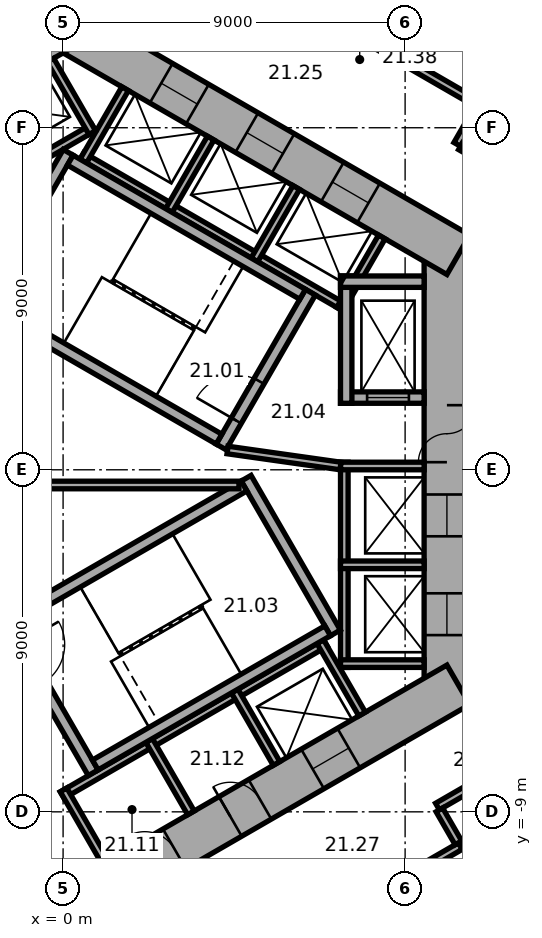
"""IFC4 building model, lengths in metres.
Left out: names, types, materials, properties, quantities, classifications, styles, units other than length and angle.
Written with IfcOpenShell. Run it as: python <this file> out.ifc"""

import sys

from ifc_helpers import new_model, si_unit, direction, frame, frame_2d, origin, place, context, subcontext, project, spatial, rectangle, extrude, element, fill, save


model = new_model("IFC4")
c1 = context("Model", 3, precision=1e-05, world=origin(), true_north=direction((0.0, 1.0)))
c2 = subcontext(c1, "Body", "Model", "MODEL_VIEW")
j1 = project(units=[si_unit("LENGTHUNIT", "METRE"), si_unit("PLANEANGLEUNIT", "RADIAN")], contexts=[c1])
p1 = place(None, origin())
s1 = spatial("IfcSite", under=j1, at=p1, CompositionType="ELEMENT")
p2 = place(p1, origin())
s2 = spatial("IfcBuilding", under=s1, at=p2, CompositionType="ELEMENT")
p3 = place(p2, frame((0.0, 0.0, 93.5)))
s3 = spatial("IfcBuildingStorey", under=s2, at=p3, CompositionType="ELEMENT", Elevation=93.5)
p4 = place(p3, frame((10.1, -6.177, 0.0), z_axis=(0.0, 0.0, 1.0), x_axis=(0.0, 1.0, 0.0)))
e1 = element("IfcWall", 1, at=p4, inside=s3, PredefinedType="SHEAR", context=c2, shape_type="SweptSolid", body=[
    extrude(rectangle(XDim=12.355, YDim=1.2, at=frame_2d((6.177, 0.0))), origin(), (0.0, 0.0, 1.0), 3.3),
])
p5 = place(p4, frame((6.378, 0.0, 0.0)))
e2 = element("IfcOpeningElement", 2, at=p5, cuts=e1, PredefinedType="OPENING", context=c2, shape_type="SweptSolid", body=[
    extrude(rectangle(XDim=1.5, YDim=2.1, at=frame_2d((0.75, 1.05))), frame((0.0, 0.61, 0.0), z_axis=(0.0, -1.0, 0.0), x_axis=(1.0, 0.0, 0.0)), (0.0, 0.0, 1.0), 1.22),
])
p6 = place(p4, frame((1.828, 0.0, 0.0)))
e3 = element("IfcOpeningElement", 3, at=p6, cuts=e1, PredefinedType="OPENING", context=c2, shape_type="SweptSolid", body=[
    extrude(rectangle(XDim=1.1, YDim=2.1, at=frame_2d((0.55, 1.05))), frame((0.0, 0.61, 0.0), z_axis=(0.0, -1.0, 0.0), x_axis=(1.0, 0.0, 0.0)), (0.0, 0.0, 1.0), 1.22),
])
p7 = place(p4, frame((4.427, 0.0, 0.0)))
e4 = element("IfcOpeningElement", 4, at=p7, cuts=e1, PredefinedType="OPENING", context=c2, shape_type="SweptSolid", body=[
    extrude(rectangle(XDim=1.1, YDim=2.1, at=frame_2d((0.55, 1.05))), frame((0.0, 0.61, 0.0), z_axis=(0.0, -1.0, 0.0), x_axis=(1.0, 0.0, 0.0)), (0.0, 0.0, 1.0), 1.22),
])
p8 = place(p3, frame((10.4, 5.658, 0.0), z_axis=(0.0, 0.0, 1.0), x_axis=(-0.866021384402, 0.500006961711, 0.0)))
e5 = element("IfcWall", 5, at=p8, inside=s3, PredefinedType="SHEAR", context=c2, shape_type="SweptSolid", body=[
    extrude(rectangle(XDim=12.355, YDim=1.2, at=frame_2d((6.178, 0.0))), origin(), (0.0, 0.0, 1.0), 3.3),
])
p9 = place(p8, frame((2.728, 0.0, 0.0)))
e6 = element("IfcOpeningElement", 6, at=p9, cuts=e5, PredefinedType="OPENING", context=c2, shape_type="SweptSolid", body=[
    extrude(rectangle(XDim=1.1, YDim=2.1, at=frame_2d((0.55, 1.05))), frame((0.0, 0.61, 0.0), z_axis=(0.0, -1.0, 0.0), x_axis=(1.0, 0.0, 0.0)), (0.0, 0.0, 1.0), 1.22),
])
p10 = place(p8, frame((5.328, 0.0, 0.0)))
e7 = element("IfcOpeningElement", 7, at=p10, cuts=e5, PredefinedType="OPENING", context=c2, shape_type="SweptSolid", body=[
    extrude(rectangle(XDim=1.1, YDim=2.1, at=frame_2d((0.55, 1.05))), frame((0.0, 0.61, 0.0), z_axis=(0.0, -1.0, 0.0), x_axis=(1.0, 0.0, 0.0)), (0.0, 0.0, 1.0), 1.22),
])
p11 = place(p8, frame((7.928, 0.0, 0.0)))
e8 = element("IfcOpeningElement", 8, at=p11, cuts=e5, PredefinedType="OPENING", context=c2, shape_type="SweptSolid", body=[
    extrude(rectangle(XDim=1.1, YDim=2.1, at=frame_2d((0.55, 1.05))), frame((0.0, 0.61, 0.0), z_axis=(0.0, -1.0, 0.0), x_axis=(1.0, 0.0, 0.0)), (0.0, 0.0, 1.0), 1.22),
])
p12 = place(p3, frame((0.3, 11.836, 0.0), z_axis=(0.0, 0.0, 1.0), x_axis=(-0.866021384402, -0.500006961711, 0.0)))
e9 = element("IfcWall", 9, at=p12, inside=s3, PredefinedType="SHEAR", context=c2, shape_type="SweptSolid", body=[
    extrude(rectangle(XDim=12.355, YDim=1.2, at=frame_2d((6.178, 0.0))), origin(), (0.0, 0.0, 1.0), 3.3),
])
p13 = place(p12, frame((6.378, 0.0, 0.0)))
e10 = element("IfcOpeningElement", 10, at=p13, cuts=e9, PredefinedType="OPENING", context=c2, shape_type="SweptSolid", body=[
    extrude(rectangle(XDim=1.5, YDim=2.1, at=frame_2d((0.75, 1.05))), frame((0.0, 0.61, 0.0), z_axis=(0.0, -1.0, 0.0), x_axis=(1.0, 0.0, 0.0)), (0.0, 0.0, 1.0), 1.22),
])
p14 = place(p12, frame((1.828, 0.0, 0.0)))
e11 = element("IfcOpeningElement", 11, at=p14, cuts=e9, PredefinedType="OPENING", context=c2, shape_type="SweptSolid", body=[
    extrude(rectangle(XDim=1.1, YDim=2.1, at=frame_2d((0.55, 1.05))), frame((0.0, 0.61, 0.0), z_axis=(0.0, -1.0, 0.0), x_axis=(1.0, 0.0, 0.0)), (0.0, 0.0, 1.0), 1.22),
])
p15 = place(p3, frame((-10.4, -5.658, 0.0), z_axis=(0.0, 0.0, 1.0), x_axis=(0.866021384402, -0.500006961711, 0.0)))
e12 = element("IfcWall", 12, at=p15, inside=s3, PredefinedType="SHEAR", context=c2, shape_type="SweptSolid", body=[
    extrude(rectangle(XDim=12.355, YDim=1.2, at=frame_2d((6.178, 0.0))), origin(), (0.0, 0.0, 1.0), 3.3),
])
p16 = place(p15, frame((6.378, 0.0, 0.0)))
e13 = element("IfcOpeningElement", 13, at=p16, cuts=e12, PredefinedType="OPENING", context=c2, shape_type="SweptSolid", body=[
    extrude(rectangle(XDim=1.5, YDim=2.1, at=frame_2d((0.75, 1.05))), frame((0.0, 0.61, 0.0), z_axis=(0.0, -1.0, 0.0), x_axis=(1.0, 0.0, 0.0)), (0.0, 0.0, 1.0), 1.22),
])
p17 = place(p15, frame((3.228, 0.0, 0.0)))
e14 = element("IfcOpeningElement", 14, at=p17, cuts=e12, PredefinedType="OPENING", context=c2, shape_type="SweptSolid", body=[
    extrude(rectangle(XDim=0.9, YDim=2.1, at=frame_2d((0.45, 1.05))), frame((0.0, 0.61, 0.0), z_axis=(0.0, -1.0, 0.0), x_axis=(1.0, 0.0, 0.0)), (0.0, 0.0, 1.0), 1.22),
])
p18 = place(p3, frame((-0.3, -11.836, 0.0), z_axis=(0.0, 0.0, 1.0), x_axis=(0.866021384402, 0.500006961711, 0.0)))
e15 = element("IfcWall", 15, at=p18, inside=s3, PredefinedType="SHEAR", context=c2, shape_type="SweptSolid", body=[
    extrude(rectangle(XDim=12.355, YDim=1.2, at=frame_2d((6.178, 0.0))), origin(), (0.0, 0.0, 1.0), 3.3),
])
p19 = place(p18, frame((2.828, 0.0, 0.0)))
e16 = element("IfcOpeningElement", 16, at=p19, cuts=e15, PredefinedType="OPENING", context=c2, shape_type="SweptSolid", body=[
    extrude(rectangle(XDim=0.9, YDim=2.1, at=frame_2d((0.45, 1.05))), frame((0.0, 0.61, 0.0), z_axis=(0.0, -1.0, 0.0), x_axis=(1.0, 0.0, 0.0)), (0.0, 0.0, 1.0), 1.22),
])
p20 = place(p18, frame((5.428, 0.0, 0.0)))
e17 = element("IfcOpeningElement", 17, at=p20, cuts=e15, PredefinedType="OPENING", context=c2, shape_type="SweptSolid", body=[
    extrude(rectangle(XDim=0.9, YDim=2.1, at=frame_2d((0.45, 1.05))), frame((0.0, 0.61, 0.0), z_axis=(0.0, -1.0, 0.0), x_axis=(1.0, 0.0, 0.0)), (0.0, 0.0, 1.0), 1.22),
])
p21 = place(p18, frame((7.928, 0.0, 0.0)))
e18 = element("IfcOpeningElement", 18, at=p21, cuts=e15, PredefinedType="OPENING", context=c2, shape_type="SweptSolid", body=[
    extrude(rectangle(XDim=1.1, YDim=2.1, at=frame_2d((0.55, 1.05))), frame((0.0, 0.61, 0.0), z_axis=(0.0, -1.0, 0.0), x_axis=(1.0, 0.0, 0.0)), (0.0, 0.0, 1.0), 1.22),
])
p22 = place(p3, frame((7.4, -5.2, 0.0), z_axis=(0.0, 0.0, 1.0), x_axis=(0.0, 1.0, 0.0)))
e19 = element("IfcWall", 19, at=p22, inside=s3, PredefinedType="PARTITIONING", context=c2, shape_type="SweptSolid", body=[
    extrude(rectangle(XDim=5.4, YDim=0.2, at=frame_2d((2.7, 0.0))), origin(), (0.0, 0.0, 1.0), 3.05),
])
for number, where, z_axis, x_axis in (
    (20, (7.3, -5.1, 0.0), (0.0, 0.0, 1.0), (1.0, 0.0, 0.0)),
    (21, (7.3, -2.5, 0.0), (0.0, 0.0, 1.0), (1.0, 0.0, 0.0)),
    (22, (7.3, 0.1, 0.0), (0.0, 0.0, 1.0), (1.0, 0.0, 0.0)),
):
    element("IfcWall", number, at=place(p3, frame(where, z_axis=z_axis, x_axis=x_axis)), inside=s3, PredefinedType="PARTITIONING", context=c2, shape_type="SweptSolid", body=[
        extrude(rectangle(XDim=2.2, YDim=0.2, at=frame_2d((1.1, 0.0))), origin(), (0.0, 0.0, 1.0), 3.05),
    ])
p23 = place(p3, frame((7.424, 4.259, 0.0), z_axis=(0.0, 0.0, 1.0), x_axis=(-0.866026010844, 0.49999894854, 0.0)))
e23 = element("IfcWall", 23, at=p23, inside=s3, PredefinedType="PARTITIONING", context=c2, shape_type="SweptSolid", body=[
    extrude(rectangle(XDim=8.0, YDim=0.2, at=frame_2d((4.0, 0.0))), origin(), (0.0, 0.0, 1.0), 3.05),
])
for number, where, z_axis, x_axis in (
    (24, (7.287, 4.222, 0.0), (0.0, 0.0, 1.0), (0.5, 0.866, 0.0)),
    (25, (5.036, 5.522, 0.0), (0.0, 0.0, 1.0), (0.5, 0.866, 0.0)),
    (26, (2.784, 6.822, 0.0), (0.0, 0.0, 1.0), (0.5, 0.866, 0.0)),
    (27, (0.532, 8.122, 0.0), (0.0, 0.0, 1.0), (0.5, 0.866, 0.0)),
):
    element("IfcWall", number, at=place(p3, frame(where, z_axis=z_axis, x_axis=x_axis)), inside=s3, PredefinedType="PARTITIONING", context=c2, shape_type="SweptSolid", body=[
        extrude(rectangle(XDim=2.2, YDim=0.2, at=frame_2d((1.1, 0.0))), origin(), (0.0, 0.0, 1.0), 3.05),
    ])
p24 = place(p3, frame((0.803, 9.009, 0.0), z_axis=(0.0, 0.0, 1.0), x_axis=(-0.866028230842, -0.499995103361, 0.0)))
e28 = element("IfcWall", 28, at=p24, inside=s3, PredefinedType="PARTITIONING", context=c2, shape_type="SweptSolid", body=[
    extrude(rectangle(XDim=5.4, YDim=0.2, at=frame_2d((2.7, 0.0))), origin(), (0.0, 0.0, 1.0), 3.05),
])
p25 = place(p3, frame((0.767, 8.872, 0.0), z_axis=(0.0, 0.0, 1.0), x_axis=(-0.499994660107, 0.866028486751, 0.0)))
e29 = element("IfcWall", 29, at=p25, inside=s3, PredefinedType="PARTITIONING", context=c2, shape_type="SweptSolid", body=[
    extrude(rectangle(XDim=2.2, YDim=0.2, at=frame_2d((1.1, 0.0))), origin(), (0.0, 0.0, 1.0), 3.05),
])
p26 = place(p3, frame((-0.024, -8.559, 0.0), z_axis=(0.0, 0.0, 1.0), x_axis=(0.866026010844, 0.49999894854, 0.0)))
e30 = element("IfcWall", 30, at=p26, inside=s3, PredefinedType="PARTITIONING", context=c2, shape_type="SweptSolid", body=[
    extrude(rectangle(XDim=8.0, YDim=0.2, at=frame_2d((4.0, 0.0))), origin(), (0.0, 0.0, 1.0), 3.05),
])
for number, where, z_axis, x_axis in (
    (31, (0.013, -8.422, 0.0), (0.0, 0.0, 1.0), (0.5, -0.866, 0.0)),
    (32, (2.264, -7.122, 0.0), (0.0, 0.0, 1.0), (0.5, -0.866, 0.0)),
    (33, (4.516, -5.822, 0.0), (0.0, 0.0, 1.0), (0.5, -0.866, 0.0)),
    (34, (6.768, -4.522, 0.0), (0.0, 0.0, 1.0), (0.5, -0.866, 0.0)),
):
    element("IfcWall", number, at=place(p3, frame(where, z_axis=z_axis, x_axis=x_axis)), inside=s3, PredefinedType="PARTITIONING", context=c2, shape_type="SweptSolid", body=[
        extrude(rectangle(XDim=2.2, YDim=0.2, at=frame_2d((1.1, 0.0))), origin(), (0.0, 0.0, 1.0), 3.05),
    ])
p27 = place(p3, frame((4.158, 0.602, 0.0), z_axis=(0.0, 0.0, 1.0), x_axis=(0.499977259774, 0.866038532462, 0.0)))
e35 = element("IfcWall", 35, at=p27, inside=s3, PredefinedType="SHEAR", context=c2, shape_type="SweptSolid", body=[
    extrude(rectangle(XDim=4.7, YDim=0.3, at=frame_2d((2.35, 0.0))), origin(), (0.0, 0.0, 1.0), 3.05),
])
p28 = place(p27, frame((0.8, 0.0, 0.0)))
e36 = element("IfcOpeningElement", 36, at=p28, cuts=e35, PredefinedType="OPENING", context=c2, shape_type="SweptSolid", body=[
    extrude(rectangle(XDim=1.2, YDim=2.1, at=frame_2d((0.6, 1.05))), frame((0.0, 0.16, 0.0), z_axis=(0.0, -1.0, 0.0), x_axis=(1.0, 0.0, 0.0)), (0.0, 0.0, 1.0), 0.32),
])
p29 = place(p3, frame((-2.216, 4.282, 0.0), z_axis=(0.0, 0.0, 1.0), x_axis=(0.499977259774, 0.866038532462, 0.0)))
e37 = element("IfcWall", 37, at=p29, inside=s3, PredefinedType="SHEAR", context=c2, shape_type="SweptSolid", body=[
    extrude(rectangle(XDim=4.7, YDim=0.3, at=frame_2d((2.35, 0.0))), origin(), (0.0, 0.0, 1.0), 3.05),
])
for number, where, z_axis, x_axis in (
    (38, (4.103, 0.807, 0.0), (0.0, 0.0, 1.0), (-0.866, 0.5, 0.0)),
    (39, (6.303, 4.617, 0.0), (0.0, 0.0, 1.0), (-0.866, 0.5, 0.0)),
):
    element("IfcWall", number, at=place(p3, frame(where, z_axis=z_axis, x_axis=x_axis)), inside=s3, PredefinedType="SHEAR", context=c2, shape_type="SweptSolid", body=[
        extrude(rectangle(XDim=7.06, YDim=0.3, at=frame_2d((3.53, 0.0))), origin(), (0.0, 0.0, 1.0), 3.05),
    ])
p30 = place(p3, frame((-1.558, -3.902, 0.0), z_axis=(0.0, 0.0, 1.0), x_axis=(0.499977259774, -0.866038532462, 0.0)))
e40 = element("IfcWall", 40, at=p30, inside=s3, PredefinedType="SHEAR", context=c2, shape_type="SweptSolid", body=[
    extrude(rectangle(XDim=4.7, YDim=0.3, at=frame_2d((2.35, 0.0))), origin(), (0.0, 0.0, 1.0), 3.05),
])
p31 = place(p30, frame((0.8, 0.0, 0.0)))
e41 = element("IfcOpeningElement", 41, at=p31, cuts=e40, PredefinedType="OPENING", context=c2, shape_type="SweptSolid", body=[
    extrude(rectangle(XDim=1.2, YDim=2.1, at=frame_2d((0.6, 1.05))), frame((0.0, 0.16, 0.0), z_axis=(0.0, -1.0, 0.0), x_axis=(1.0, 0.0, 0.0)), (0.0, 0.0, 1.0), 0.32),
])
p32 = place(p3, frame((4.816, -0.222, 0.0), z_axis=(0.0, 0.0, 1.0), x_axis=(0.499977259774, -0.866038532462, 0.0)))
e42 = element("IfcWall", 42, at=p32, inside=s3, PredefinedType="SHEAR", context=c2, shape_type="SweptSolid", body=[
    extrude(rectangle(XDim=4.7, YDim=0.3, at=frame_2d((2.35, 0.0))), origin(), (0.0, 0.0, 1.0), 3.05),
])
for number, where, z_axis, x_axis in (
    (43, (-1.353, -3.957, 0.0), (0.0, 0.0, 1.0), (0.866, 0.5, 0.0)),
    (44, (0.847, -7.767, 0.0), (0.0, 0.0, 1.0), (0.866, 0.5, 0.0)),
):
    element("IfcWall", number, at=place(p3, frame(where, z_axis=z_axis, x_axis=x_axis)), inside=s3, PredefinedType="SHEAR", context=c2, shape_type="SweptSolid", body=[
        extrude(rectangle(XDim=7.06, YDim=0.3, at=frame_2d((3.53, 0.0))), origin(), (0.0, 0.0, 1.0), 3.05),
    ])
p33 = place(p3, frame((7.3, 1.9, 0.0), z_axis=(0.0, 0.0, 1.0), x_axis=(1.0, 0.0, 0.0)))
e45 = element("IfcWall", 45, at=p33, inside=s3, PredefinedType="SHEAR", context=c2, shape_type="SweptSolid", body=[
    extrude(rectangle(XDim=2.2, YDim=0.3, at=frame_2d((1.1, 0.0))), origin(), (0.0, 0.0, 1.0), 3.05),
])
p34 = place(p33, frame((0.7, 0.0, 0.0)))
e46 = element("IfcOpeningElement", 46, at=p34, cuts=e45, PredefinedType="OPENING", context=c2, shape_type="SweptSolid", body=[
    extrude(rectangle(XDim=1.1, YDim=2.1, at=frame_2d((0.55, 1.05))), frame((0.0, 0.16, 0.0), z_axis=(0.0, -1.0, 0.0), x_axis=(1.0, 0.0, 0.0)), (0.0, 0.0, 1.0), 0.32),
])
p35 = place(p3, frame((7.45, 1.75, 0.0), z_axis=(0.0, 0.0, 1.0), x_axis=(0.0, 1.0, 0.0)))
e47 = element("IfcWall", 47, at=p35, inside=s3, PredefinedType="SHEAR", context=c2, shape_type="SweptSolid", body=[
    extrude(rectangle(XDim=3.35, YDim=0.3, at=frame_2d((1.675, 0.0))), origin(), (0.0, 0.0, 1.0), 3.05),
])
p36 = place(p3, frame((7.3, 4.95, 0.0), z_axis=(0.0, 0.0, 1.0), x_axis=(1.0, 0.0, 0.0)))
e48 = element("IfcWall", 48, at=p36, inside=s3, PredefinedType="SHEAR", context=c2, shape_type="SweptSolid", body=[
    extrude(rectangle(XDim=2.2, YDim=0.3, at=frame_2d((1.1, 0.0))), origin(), (0.0, 0.0, 1.0), 3.05),
])
p37 = place(p3, frame((4.327, 0.521, 0.0), z_axis=(0.0, 0.0, 1.0), x_axis=(0.990124376366, -0.14019172346, 0.0)))
e49 = element("IfcWall", 49, at=p37, inside=s3, PredefinedType="PARTITIONING", context=c2, shape_type="SweptSolid", body=[
    extrude(rectangle(XDim=3.002, YDim=0.2, at=frame_2d((1.501, 0.0))), origin(), (0.0, 0.0, 1.0), 3.05),
])
p38 = place(p3, frame((-2.72, -0.4, 0.0), z_axis=(0.0, 0.0, 1.0), x_axis=(1.0, 0.0, 0.0)))
e50 = element("IfcWall", 50, at=p38, inside=s3, PredefinedType="PARTITIONING", context=c2, shape_type="SweptSolid", body=[
    extrude(rectangle(XDim=7.347, YDim=0.2, at=frame_2d((3.674, 0.0))), origin(), (0.0, 0.0, 1.0), 3.05),
])
p39 = place(p3, frame((7.419, -11.653, 0.0), z_axis=(0.0, 0.0, 1.0), x_axis=(0.866038154057, 0.49997791523, 0.0)))
e51 = element("IfcWall", 51, at=p39, inside=s3, PredefinedType="PARTITIONING", context=c2, shape_type="SweptSolid", body=[
    extrude(rectangle(XDim=3.502, YDim=0.2, at=frame_2d((1.751, 0.0))), origin(), (0.0, 0.0, 1.0), 3.05),
])
p40 = place(p3, frame((9.852, -8.861, 0.0), z_axis=(0.0, 0.0, 1.0), x_axis=(0.866013291437, 0.500020978615, 0.0)))
e52 = element("IfcWall", 52, at=p40, inside=s3, PredefinedType="PARTITIONING", context=c2, shape_type="SweptSolid", body=[
    extrude(rectangle(XDim=2.077, YDim=0.2, at=frame_2d((1.038, 0.0))), origin(), (0.0, 0.0, 1.0), 3.05),
])
p41 = place(p3, frame((10.371, 8.561, 0.0), z_axis=(0.0, 0.0, 1.0), x_axis=(0.499986357472, 0.866033280158, 0.0)))
e53 = element("IfcWall", 53, at=p41, inside=s3, PredefinedType="PARTITIONING", context=c2, shape_type="SweptSolid", body=[
    extrude(rectangle(XDim=1.201, YDim=0.2, at=frame_2d((0.601, 0.0))), origin(), (0.0, 0.0, 1.0), 3.05),
])
p42 = place(p3, frame((10.402, -9.815, 0.0), z_axis=(0.0, 0.0, 1.0), x_axis=(-0.499968756647, 0.866043441391, 0.0)))
e54 = element("IfcWall", 54, at=p42, inside=s3, PredefinedType="PARTITIONING", context=c2, shape_type="SweptSolid", body=[
    extrude(rectangle(XDim=1.001, YDim=0.2, at=frame_2d((0.5, 0.0))), origin(), (0.0, 0.0, 1.0), 3.05),
])
p43 = place(p3, frame((10.885, 9.652, 0.0), z_axis=(0.0, 0.0, 1.0), x_axis=(-0.866033868542, 0.499985338323, 0.0)))
e55 = element("IfcWall", 55, at=p43, inside=s3, PredefinedType="PARTITIONING", context=c2, shape_type="SweptSolid", body=[
    extrude(rectangle(XDim=8.602, YDim=0.2, at=frame_2d((4.301, 0.0))), origin(), (0.0, 0.0, 1.0), 3.05),
])
p44 = place(p43, frame((2.739, 0.0, 0.0)))
e56 = element("IfcOpeningElement", 56, at=p44, cuts=e55, PredefinedType="OPENING", context=c2, shape_type="SweptSolid", body=[
    extrude(rectangle(XDim=1.0, YDim=2.1, at=frame_2d((0.5, 1.05))), frame((0.0, 0.11, 0.0), z_axis=(0.0, -1.0, 0.0), x_axis=(1.0, 0.0, 0.0)), (0.0, 0.0, 1.0), 0.22),
])
p45 = place(p3, frame((11.566, 7.871, 0.0), z_axis=(0.0, 0.0, 1.0), x_axis=(-0.866004557827, 0.500036104519, 0.0)))
e57 = element("IfcWall", 57, at=p45, inside=s3, PredefinedType="PARTITIONING", context=c2, shape_type="SweptSolid", body=[
    extrude(rectangle(XDim=1.28, YDim=0.2, at=frame_2d((0.64, 0.0))), origin(), (0.0, 0.0, 1.0), 3.05),
])
p46 = place(p3, frame((12.866, 10.702, 0.0), z_axis=(0.0, 0.0, 1.0), x_axis=(-0.866023151433, 0.500003901167, 0.0)))
e58 = element("IfcWall", 58, at=p46, inside=s3, PredefinedType="PARTITIONING", context=c2, shape_type="SweptSolid", body=[
    extrude(rectangle(XDim=7.684, YDim=0.12, at=frame_2d((3.842, 0.0))), origin(), (0.0, 0.0, 1.0), 3.05),
])
p47 = place(p46, frame((0.55, 0.0, 0.0)))
e59 = element("IfcOpeningElement", 59, at=p47, cuts=e58, PredefinedType="OPENING", context=c2, shape_type="SweptSolid", body=[
    extrude(rectangle(XDim=1.0, YDim=2.1, at=frame_2d((0.5, 1.05))), frame((0.0, 0.07, 0.0), z_axis=(0.0, -1.0, 0.0), x_axis=(1.0, 0.0, 0.0)), (0.0, 0.0, 1.0), 0.14),
])
p48 = place(p46, frame((2.8, 0.0, 0.0)))
e60 = element("IfcOpeningElement", 60, at=p48, cuts=e58, PredefinedType="OPENING", context=c2, shape_type="SweptSolid", body=[
    extrude(rectangle(XDim=0.9, YDim=2.1, at=frame_2d((0.45, 1.05))), frame((0.0, 0.07, 0.0), z_axis=(0.0, -1.0, 0.0), x_axis=(1.0, 0.0, 0.0)), (0.0, 0.0, 1.0), 0.14),
])
p49 = place(p46, frame((5.592, 0.0, 0.0)))
e61 = element("IfcOpeningElement", 61, at=p49, cuts=e58, PredefinedType="OPENING", context=c2, shape_type="SweptSolid", body=[
    extrude(rectangle(XDim=0.9, YDim=2.1, at=frame_2d((0.45, 1.05))), frame((0.0, 0.07, 0.0), z_axis=(0.0, -1.0, 0.0), x_axis=(1.0, 0.0, 0.0)), (0.0, 0.0, 1.0), 0.14),
])
p50 = place(p5, origin())
e62 = element("IfcDoor", 62, at=p50, inside=s3, OperationType="DOUBLE_DOOR_SINGLE_SWING", PredefinedType="DOOR", context=c2, shape_type="SweptSolid", body=[
    extrude(rectangle(XDim=1.5, YDim=2.1, at=frame_2d((0.75, 1.05))), frame((0.0, 0.025, 0.0), z_axis=(0.0, -1.0, 0.0), x_axis=(1.0, 0.0, 0.0)), (0.0, 0.0, 1.0), 0.05),
])
fill(e2, e62)
p51 = place(p28, origin())
e63 = element("IfcDoor", 63, at=p51, inside=s3, OperationType="SINGLE_SWING_RIGHT", PredefinedType="DOOR", context=c2, shape_type="SweptSolid", body=[
    extrude(rectangle(XDim=1.2, YDim=2.1, at=frame_2d((0.6, 1.05))), frame((0.0, 0.025, 0.0), z_axis=(0.0, -1.0, 0.0), x_axis=(1.0, 0.0, 0.0)), (0.0, 0.0, 1.0), 0.05),
])
fill(e36, e63)
p52 = place(p19, origin())
e64 = element("IfcDoor", 64, at=p52, inside=s3, OperationType="SINGLE_SWING_LEFT", PredefinedType="DOOR", context=c2, shape_type="SweptSolid", body=[
    extrude(rectangle(XDim=0.9, YDim=2.1, at=frame_2d((0.45, 1.05))), frame((0.0, 0.025, 0.0), z_axis=(0.0, -1.0, 0.0), x_axis=(1.0, 0.0, 0.0)), (0.0, 0.0, 1.0), 0.05),
])
fill(e16, e64)
p53 = place(p20, origin())
e65 = element("IfcDoor", 65, at=p53, inside=s3, OperationType="SINGLE_SWING_LEFT", PredefinedType="DOOR", context=c2, shape_type="SweptSolid", body=[
    extrude(rectangle(XDim=0.9, YDim=2.1, at=frame_2d((0.45, 1.05))), frame((0.0, 0.025, 0.0), z_axis=(0.0, -1.0, 0.0), x_axis=(1.0, 0.0, 0.0)), (0.0, 0.0, 1.0), 0.05),
])
fill(e17, e65)
p54 = place(p34, origin())
e66 = element("IfcDoor", 66, at=p54, inside=s3, OperationType="DOUBLE_DOOR_SLIDING", PredefinedType="DOOR", context=c2, shape_type="SweptSolid", body=[
    extrude(rectangle(XDim=1.1, YDim=2.1, at=frame_2d((0.55, 1.05))), frame((0.0, 0.025, 0.0), z_axis=(0.0, -1.0, 0.0), x_axis=(1.0, 0.0, 0.0)), (0.0, 0.0, 1.0), 0.05),
])
fill(e46, e66)
p55 = place(p6, origin())
e67 = element("IfcDoor", 67, at=p55, inside=s3, OperationType="DOUBLE_DOOR_SLIDING", PredefinedType="DOOR", context=c2, shape_type="SweptSolid", body=[
    extrude(rectangle(XDim=1.1, YDim=2.1, at=frame_2d((0.55, 1.05))), frame((0.0, 0.025, 0.0), z_axis=(0.0, -1.0, 0.0), x_axis=(1.0, 0.0, 0.0)), (0.0, 0.0, 1.0), 0.05),
])
fill(e3, e67)
p56 = place(p7, origin())
e68 = element("IfcDoor", 68, at=p56, inside=s3, OperationType="DOUBLE_DOOR_SLIDING", PredefinedType="DOOR", context=c2, shape_type="SweptSolid", body=[
    extrude(rectangle(XDim=1.1, YDim=2.1, at=frame_2d((0.55, 1.05))), frame((0.0, 0.025, 0.0), z_axis=(0.0, -1.0, 0.0), x_axis=(1.0, 0.0, 0.0)), (0.0, 0.0, 1.0), 0.05),
])
fill(e4, e68)
p57 = place(p9, origin())
e69 = element("IfcDoor", 69, at=p57, inside=s3, OperationType="DOUBLE_DOOR_SLIDING", PredefinedType="DOOR", context=c2, shape_type="SweptSolid", body=[
    extrude(rectangle(XDim=1.1, YDim=2.1, at=frame_2d((0.55, 1.05))), frame((0.0, 0.025, 0.0), z_axis=(0.0, -1.0, 0.0), x_axis=(1.0, 0.0, 0.0)), (0.0, 0.0, 1.0), 0.05),
])
fill(e6, e69)
p58 = place(p10, origin())
e70 = element("IfcDoor", 70, at=p58, inside=s3, OperationType="DOUBLE_DOOR_SLIDING", PredefinedType="DOOR", context=c2, shape_type="SweptSolid", body=[
    extrude(rectangle(XDim=1.1, YDim=2.1, at=frame_2d((0.55, 1.05))), frame((0.0, 0.025, 0.0), z_axis=(0.0, -1.0, 0.0), x_axis=(1.0, 0.0, 0.0)), (0.0, 0.0, 1.0), 0.05),
])
fill(e7, e70)
p59 = place(p11, origin())
e71 = element("IfcDoor", 71, at=p59, inside=s3, OperationType="DOUBLE_DOOR_SLIDING", PredefinedType="DOOR", context=c2, shape_type="SweptSolid", body=[
    extrude(rectangle(XDim=1.1, YDim=2.1, at=frame_2d((0.55, 1.05))), frame((0.0, 0.025, 0.0), z_axis=(0.0, -1.0, 0.0), x_axis=(1.0, 0.0, 0.0)), (0.0, 0.0, 1.0), 0.05),
])
fill(e8, e71)
p60 = place(p21, origin())
e72 = element("IfcDoor", 72, at=p60, inside=s3, OperationType="DOUBLE_DOOR_SLIDING", PredefinedType="DOOR", context=c2, shape_type="SweptSolid", body=[
    extrude(rectangle(XDim=1.1, YDim=2.1, at=frame_2d((0.55, 1.05))), frame((0.0, 0.025, 0.0), z_axis=(0.0, -1.0, 0.0), x_axis=(1.0, 0.0, 0.0)), (0.0, 0.0, 1.0), 0.05),
])
fill(e18, e72)
save(model, sys.argv[1])
